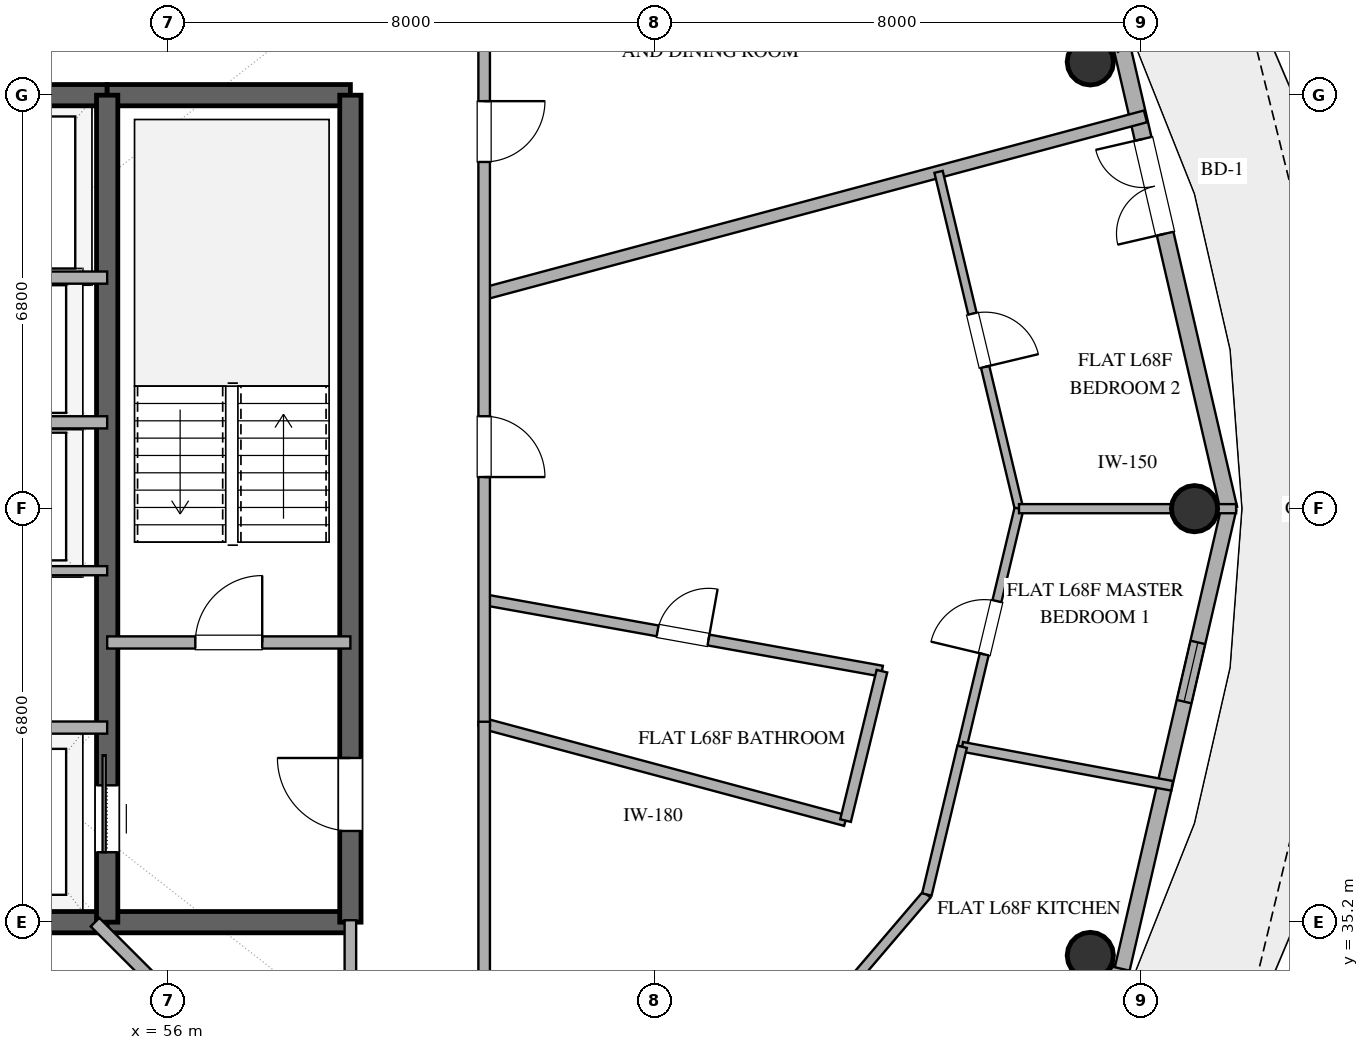
"""IFC4 building model, lengths in metres.
Left out: names, types, materials, properties, quantities, classifications, styles, units other than length and angle.
Written with IfcOpenShell. Run it as: python <this file> out.ifc"""

import sys

from ifc_helpers import new_model, si_unit, direction, frame, frame_2d, origin, origin_2d, place, context, subcontext, project, spatial, rectangle, hollow_circle, extrude, element, fill, save


model = new_model("IFC4")
c1 = context("Model", 3, precision=1e-05, world=origin(), true_north=direction((0.0, 1.0)))
c2 = subcontext(c1, "Body", "Model", "MODEL_VIEW")
j1 = project(units=[si_unit("LENGTHUNIT", "METRE"), si_unit("PLANEANGLEUNIT", "RADIAN")], contexts=[c1])
p1 = place(None, origin())
s1 = spatial("IfcSite", under=j1, at=p1, CompositionType="ELEMENT")
p2 = place(p1, origin())
s2 = spatial("IfcBuilding", under=s1, at=p2, CompositionType="ELEMENT")
p3 = place(p2, frame((0.0, 0.0, 265.8)))
s3 = spatial("IfcBuildingStorey", under=s2, at=p3, CompositionType="ELEMENT", Elevation=265.8)
p4 = place(p3, frame((41.0, 35.2, 0.0), z_axis=(0.0, 0.0, 1.0), x_axis=(1.0, 0.0, 0.0)))
e1 = element("IfcWall", 1, at=p4, inside=s3, PredefinedType="SHEAR", context=c2, shape_type="SweptSolid", body=[
    extrude(rectangle(XDim=14.0, YDim=0.35, at=frame_2d((7.0, 0.0))), origin(), (0.0, 0.0, 1.0), 3.37),
])
p5 = place(p4, frame((6.1, 0.0, 0.0)))
e2 = element("IfcOpeningElement", 2, at=p5, cuts=e1, PredefinedType="OPENING", context=c2, shape_type="SweptSolid", body=[
    extrude(rectangle(XDim=1.8, YDim=2.25, at=frame_2d((0.9, 1.125))), frame((0.0, 0.185, 0.0), z_axis=(0.0, -1.0, 0.0), x_axis=(1.0, 0.0, 0.0)), (0.0, 0.0, 1.0), 0.37),
])
p6 = place(p3, frame((55.0, 35.2, 0.0), z_axis=(0.0, 0.0, 1.0), x_axis=(1.0, 0.0, 0.0)))
e3 = element("IfcWall", 3, at=p6, inside=s3, PredefinedType="SHEAR", context=c2, shape_type="SweptSolid", body=[
    extrude(rectangle(XDim=4.0, YDim=0.35, at=frame_2d((2.0, 0.0))), origin(), (0.0, 0.0, 1.0), 3.37),
])
p7 = place(p3, frame((41.0, 48.8, 0.0), z_axis=(0.0, 0.0, 1.0), x_axis=(1.0, 0.0, 0.0)))
e4 = element("IfcWall", 4, at=p7, inside=s3, PredefinedType="SHEAR", context=c2, shape_type="SweptSolid", body=[
    extrude(rectangle(XDim=14.0, YDim=0.35, at=frame_2d((7.0, 0.0))), origin(), (0.0, 0.0, 1.0), 3.37),
])
p8 = place(p7, frame((6.1, 0.0, 0.0)))
e5 = element("IfcOpeningElement", 5, at=p8, cuts=e4, PredefinedType="OPENING", context=c2, shape_type="SweptSolid", body=[
    extrude(rectangle(XDim=1.8, YDim=2.25, at=frame_2d((0.9, 1.125))), frame((0.0, 0.185, 0.0), z_axis=(0.0, -1.0, 0.0), x_axis=(1.0, 0.0, 0.0)), (0.0, 0.0, 1.0), 0.37),
])
p9 = place(p3, frame((55.0, 48.8, 0.0), z_axis=(0.0, 0.0, 1.0), x_axis=(1.0, 0.0, 0.0)))
e6 = element("IfcWall", 6, at=p9, inside=s3, PredefinedType="SHEAR", context=c2, shape_type="SweptSolid", body=[
    extrude(rectangle(XDim=4.0, YDim=0.35, at=frame_2d((2.0, 0.0))), origin(), (0.0, 0.0, 1.0), 3.37),
])
p10 = place(p3, frame((59.0, 35.2, 0.0), z_axis=(0.0, 0.0, 1.0), x_axis=(0.0, 1.0, 0.0)))
e7 = element("IfcWall", 7, at=p10, inside=s3, PredefinedType="SHEAR", context=c2, shape_type="SweptSolid", body=[
    extrude(rectangle(XDim=13.6, YDim=0.35, at=frame_2d((6.8, 0.0))), origin(), (0.0, 0.0, 1.0), 3.37),
])
p11 = place(p10, frame((1.5, 0.0, 0.0)))
e8 = element("IfcOpeningElement", 8, at=p11, cuts=e7, PredefinedType="OPENING", context=c2, shape_type="SweptSolid", body=[
    extrude(rectangle(XDim=1.2, YDim=2.15, at=frame_2d((0.6, 1.075))), frame((0.0, 0.185, 0.0), z_axis=(0.0, -1.0, 0.0), x_axis=(1.0, 0.0, 0.0)), (0.0, 0.0, 1.0), 0.37),
])
p12 = place(p3, frame((55.0, 35.2, 0.0), z_axis=(0.0, 0.0, 1.0), x_axis=(0.0, 1.0, 0.0)))
e9 = element("IfcWall", 9, at=p12, inside=s3, PredefinedType="SHEAR", context=c2, shape_type="SweptSolid", body=[
    extrude(rectangle(XDim=13.6, YDim=0.35, at=frame_2d((6.8, 0.0))), origin(), (0.0, 0.0, 1.0), 3.37),
])
p13 = place(p12, frame((1.15, 0.0, 0.0)))
e10 = element("IfcOpeningElement", 10, at=p13, cuts=e9, PredefinedType="OPENING", context=c2, shape_type="SweptSolid", body=[
    extrude(rectangle(XDim=1.1, YDim=2.2, at=frame_2d((0.55, 1.1))), frame((0.0, 0.185, 0.0), z_axis=(0.0, -1.0, 0.0), x_axis=(1.0, 0.0, 0.0)), (0.0, 0.0, 1.0), 0.37),
])
for number, where, z_axis, x_axis in (
    (11, (72.883, 42.0, 0.0), (0.0, 0.0, 1.0), (1.0, 0.0, 0.0)),
    (12, (71.169, 49.347, 0.0), (0.0, 0.0, 1.0), (1.0, 0.0, 0.0)),
    (13, (71.169, 34.653, 0.0), (0.0, 0.0, 1.0), (1.0, 0.0, 0.0)),
):
    element("IfcColumn", number, at=place(p3, frame(where, z_axis=z_axis, x_axis=x_axis)), inside=s3, PredefinedType="COLUMN", context=c2, shape_type="SweptSolid", body=[
        extrude(hollow_circle(Radius=0.381, WallThickness=0.025, at=origin_2d()), origin(), (0.0, 0.0, 1.0), 3.37),
    ])
p14 = place(p3, frame((73.447, 42.0, 0.0), z_axis=(0.0, 0.0, 1.0), x_axis=(-0.225635078214, 0.974211892495, 0.0)))
e14 = element("IfcWall", 14, at=p14, inside=s3, PredefinedType="SOLIDWALL", context=c2, shape_type="SweptSolid", body=[
    extrude(rectangle(XDim=7.77, YDim=0.28, at=frame_2d((3.885, 0.0))), origin(), (0.0, 0.0, 1.0), 3.37),
])
p15 = place(p14, frame((4.642, 0.0, 0.0)))
e15 = element("IfcOpeningElement", 15, at=p15, cuts=e14, PredefinedType="OPENING", context=c2, shape_type="SweptSolid", body=[
    extrude(rectangle(XDim=1.6, YDim=2.25, at=frame_2d((0.8, 1.125))), frame((0.0, 0.15, 0.0), z_axis=(0.0, -1.0, 0.0), x_axis=(1.0, 0.0, 0.0)), (0.0, 0.0, 1.0), 0.3),
])
p16 = place(p3, frame((66.383, 28.013, 0.0), z_axis=(0.0, 0.0, 1.0), x_axis=(0.63761509934, 0.770355103243, 0.0)))
e16 = element("IfcWall", 16, at=p16, inside=s3, PredefinedType="SOLIDWALL", context=c2, shape_type="SweptSolid", body=[
    extrude(rectangle(XDim=8.33, YDim=0.28, at=frame_2d((4.165, 0.0))), origin(), (0.0, 0.0, 1.0), 3.37),
])
p17 = place(p16, frame((1.789, 0.0, 0.85)))
e17 = element("IfcOpeningElement", 17, at=p17, cuts=e16, PredefinedType="OPENING", context=c2, shape_type="SweptSolid", body=[
    extrude(rectangle(XDim=1.5, YDim=2.0, at=frame_2d((0.75, 1.0))), frame((0.0, 0.15, 0.0), z_axis=(0.0, -1.0, 0.0), x_axis=(1.0, 0.0, 0.0)), (0.0, 0.0, 1.0), 0.3),
])
p18 = place(p16, frame((3.621, 0.0, 0.85)))
e18 = element("IfcOpeningElement", 18, at=p18, cuts=e16, PredefinedType="OPENING", context=c2, shape_type="SweptSolid", body=[
    extrude(rectangle(XDim=1.5, YDim=2.0, at=frame_2d((0.75, 1.0))), frame((0.0, 0.15, 0.0), z_axis=(0.0, -1.0, 0.0), x_axis=(1.0, 0.0, 0.0)), (0.0, 0.0, 1.0), 0.3),
])
p19 = place(p3, frame((71.694, 34.43, 0.0), z_axis=(0.0, 0.0, 1.0), x_axis=(0.225635078214, 0.974211892495, 0.0)))
e19 = element("IfcWall", 19, at=p19, inside=s3, PredefinedType="SOLIDWALL", context=c2, shape_type="SweptSolid", body=[
    extrude(rectangle(XDim=7.77, YDim=0.25, at=frame_2d((3.885, 0.0))), origin(), (0.0, 0.0, 1.0), 3.37),
])
p20 = place(p19, frame((4.513, 0.0, 0.35)))
e20 = element("IfcOpeningElement", 20, at=p20, cuts=e19, PredefinedType="OPENING", context=c2, shape_type="SweptSolid", body=[
    extrude(rectangle(XDim=1.0, YDim=1.05, at=frame_2d((0.5, 0.525))), frame((0.0, 0.135, 0.0), z_axis=(0.0, -1.0, 0.0), x_axis=(1.0, 0.0, 0.0)), (0.0, 0.0, 1.0), 0.27),
])
p21 = place(p3, frame((55.0, 39.8, 0.0), z_axis=(0.0, 0.0, 1.0), x_axis=(1.0, 0.0, 0.0)))
e21 = element("IfcWall", 21, at=p21, inside=s3, PredefinedType="SOLIDWALL", context=c2, shape_type="SweptSolid", body=[
    extrude(rectangle(XDim=4.0, YDim=0.2, at=frame_2d((2.0, 0.0))), origin(), (0.0, 0.0, 1.0), 2.73),
])
p22 = place(p21, frame((1.45, 0.0, 0.0)))
e22 = element("IfcOpeningElement", 22, at=p22, cuts=e21, PredefinedType="OPENING", context=c2, shape_type="SweptSolid", body=[
    extrude(rectangle(XDim=1.1, YDim=2.15, at=frame_2d((0.55, 1.075))), frame((0.0, 0.11, 0.0), z_axis=(0.0, -1.0, 0.0), x_axis=(1.0, 0.0, 0.0)), (0.0, 0.0, 1.0), 0.22),
])
for number, where, z_axis, x_axis in (
    (23, (52.05, 38.4, 0.0), (0.0, 0.0, 1.0), (1.0, 0.0, 0.0)),
    (24, (52.05, 43.42, 0.0), (0.0, 0.0, 1.0), (1.0, 0.0, 0.0)),
    (25, (52.05, 45.8, 0.0), (0.0, 0.0, 1.0), (1.0, 0.0, 0.0)),
):
    element("IfcWall", number, at=place(p3, frame(where, z_axis=z_axis, x_axis=x_axis)), inside=s3, PredefinedType="SOLIDWALL", context=c2, shape_type="SweptSolid", body=[
        extrude(rectangle(XDim=2.95, YDim=0.2, at=frame_2d((1.475, 0.0))), origin(), (0.0, 0.0, 1.0), 2.73),
    ])
p23 = place(p3, frame((49.5, 40.98, 0.0), z_axis=(0.0, 0.0, 1.0), x_axis=(1.0, 0.0, 0.0)))
e26 = element("IfcWall", 26, at=p23, inside=s3, PredefinedType="PARTITIONING", context=c2, shape_type="SweptSolid", body=[
    extrude(rectangle(XDim=5.5, YDim=0.15, at=frame_2d((2.75, 0.0))), origin(), (0.0, 0.0, 1.0), 2.73),
])
p24 = place(p3, frame((63.561, 26.439, 0.0), z_axis=(0.0, 0.0, 1.0), x_axis=(-0.707106781187, 0.707106781187, 0.0)))
e27 = element("IfcWall", 27, at=p24, inside=s3, PredefinedType="PARTITIONING", context=c2, shape_type="SweptSolid", body=[
    extrude(rectangle(XDim=12.389, YDim=0.2, at=frame_2d((6.195, 0.0))), origin(), (0.0, 0.0, 1.0), 2.73),
])
p25 = place(p3, frame((51.322, 35.2, 0.0), z_axis=(0.0, 0.0, 1.0), x_axis=(0.343730484072, -0.939068343796, 0.0)))
e28 = element("IfcWall", 28, at=p25, inside=s3, PredefinedType="PLUMBINGWALL", context=c2, shape_type="SweptSolid", body=[
    extrude(rectangle(XDim=7.897, YDim=0.18, at=frame_2d((3.949, 0.0))), origin(), (0.0, 0.0, 1.0), 2.73),
])
p26 = place(p25, frame((3.524, 0.0, 0.0)))
e29 = element("IfcOpeningElement", 29, at=p26, cuts=e28, PredefinedType="OPENING", context=c2, shape_type="SweptSolid", body=[
    extrude(rectangle(XDim=0.85, YDim=2.1, at=frame_2d((0.425, 1.05))), frame((0.0, 0.1, 0.0), z_axis=(0.0, -1.0, 0.0), x_axis=(1.0, 0.0, 0.0)), (0.0, 0.0, 1.0), 0.2),
])
p27 = place(p3, frame((72.076, 48.451, 0.0), z_axis=(0.0, 0.0, 1.0), x_axis=(-0.965923661364, -0.258827124578, 0.0)))
e30 = element("IfcWall", 30, at=p27, inside=s3, PredefinedType="PARTITIONING", context=c2, shape_type="SweptSolid", body=[
    extrude(rectangle(XDim=11.26, YDim=0.2, at=frame_2d((5.63, 0.0))), origin(), (0.0, 0.0, 1.0), 2.73),
])
p28 = place(p3, frame((61.2, 40.503, 0.0), z_axis=(0.0, 0.0, 1.0), x_axis=(0.984255481107, -0.176751656034, 0.0)))
e31 = element("IfcWall", 31, at=p28, inside=s3, PredefinedType="PLUMBINGWALL", context=c2, shape_type="SweptSolid", body=[
    extrude(rectangle(XDim=6.647, YDim=0.18, at=frame_2d((3.323, 0.0))), origin(), (0.0, 0.0, 1.0), 2.73),
])
p29 = place(p28, frame((2.898, 0.0, 0.0)))
e32 = element("IfcOpeningElement", 32, at=p29, cuts=e31, PredefinedType="OPENING", context=c2, shape_type="SweptSolid", body=[
    extrude(rectangle(XDim=0.85, YDim=2.1, at=frame_2d((0.425, 1.05))), frame((0.0, 0.1, 0.0), z_axis=(0.0, -1.0, 0.0), x_axis=(1.0, 0.0, 0.0)), (0.0, 0.0, 1.0), 0.2),
])
p30 = place(p3, frame((67.144, 36.871, 0.0), z_axis=(0.0, 0.0, 1.0), x_axis=(-0.965930696626, 0.258800868073, 0.0)))
e33 = element("IfcWall", 33, at=p30, inside=s3, PredefinedType="PLUMBINGWALL", context=c2, shape_type="SweptSolid", body=[
    extrude(rectangle(XDim=6.154, YDim=0.18, at=frame_2d((3.077, 0.0))), origin(), (0.0, 0.0, 1.0), 2.73),
])
p31 = place(p3, frame((68.673, 47.539, 0.0), z_axis=(0.0, 0.0, 1.0), x_axis=(0.232304342064, -0.972643147644, 0.0)))
e34 = element("IfcWall", 34, at=p31, inside=s3, PredefinedType="PARTITIONING", context=c2, shape_type="SweptSolid", body=[
    extrude(rectangle(XDim=5.695, YDim=0.14, at=frame_2d((2.848, 0.0))), origin(), (0.0, 0.0, 1.0), 2.73),
])
p32 = place(p31, frame((2.398, 0.0, 0.0)))
e35 = element("IfcOpeningElement", 35, at=p32, cuts=e34, PredefinedType="OPENING", context=c2, shape_type="SweptSolid", body=[
    extrude(rectangle(XDim=0.9, YDim=2.1, at=frame_2d((0.45, 1.05))), frame((0.0, 0.08, 0.0), z_axis=(0.0, -1.0, 0.0), x_axis=(1.0, 0.0, 0.0)), (0.0, 0.0, 1.0), 0.16),
])
p33 = place(p3, frame((61.2, 50.9, 0.0), z_axis=(0.0, 0.0, 1.0), x_axis=(0.0, -1.0, 0.0)))
e36 = element("IfcWall", 36, at=p33, inside=s3, PredefinedType="PARTITIONING", context=c2, shape_type="SweptSolid", body=[
    extrude(rectangle(XDim=12.47, YDim=0.19, at=frame_2d((6.235, 0.0))), origin(), (0.0, 0.0, 1.0), 2.73),
])
p34 = place(p33, frame((2.198, 0.0, 0.0)))
e37 = element("IfcOpeningElement", 37, at=p34, cuts=e36, PredefinedType="OPENING", context=c2, shape_type="SweptSolid", body=[
    extrude(rectangle(XDim=1.0, YDim=2.2, at=frame_2d((0.5, 1.1))), frame((0.0, 0.105, 0.0), z_axis=(0.0, -1.0, 0.0), x_axis=(1.0, 0.0, 0.0)), (0.0, 0.0, 1.0), 0.21),
])
p35 = place(p33, frame((7.38, 0.0, 0.0)))
e38 = element("IfcOpeningElement", 38, at=p35, cuts=e36, PredefinedType="OPENING", context=c2, shape_type="SweptSolid", body=[
    extrude(rectangle(XDim=1.0, YDim=2.2, at=frame_2d((0.5, 1.1))), frame((0.0, 0.105, 0.0), z_axis=(0.0, -1.0, 0.0), x_axis=(1.0, 0.0, 0.0)), (0.0, 0.0, 1.0), 0.21),
])
p36 = place(p3, frame((61.2, 38.496, 0.0), z_axis=(0.0, 0.0, 1.0), x_axis=(0.0, -1.0, 0.0)))
e39 = element("IfcWall", 39, at=p36, inside=s3, PredefinedType="PARTITIONING", context=c2, shape_type="SweptSolid", body=[
    extrude(rectangle(XDim=4.496, YDim=0.19, at=frame_2d((2.248, 0.0))), origin(), (0.0, 0.0, 1.0), 2.73),
])
p37 = place(p3, frame((69.061, 38.084, 0.0), z_axis=(0.0, 0.0, 1.0), x_axis=(0.232333768072, 0.972636119118, 0.0)))
e40 = element("IfcWall", 40, at=p37, inside=s3, PredefinedType="PARTITIONING", context=c2, shape_type="SweptSolid", body=[
    extrude(rectangle(XDim=4.026, YDim=0.15, at=frame_2d((2.013, 0.0))), origin(), (0.0, 0.0, 1.0), 2.73),
])
p38 = place(p37, frame((1.563, 0.0, 0.0)))
e41 = element("IfcOpeningElement", 41, at=p38, cuts=e40, PredefinedType="OPENING", context=c2, shape_type="SweptSolid", body=[
    extrude(rectangle(XDim=0.9, YDim=2.1, at=frame_2d((0.45, 1.05))), frame((0.0, 0.085, 0.0), z_axis=(0.0, -1.0, 0.0), x_axis=(1.0, 0.0, 0.0)), (0.0, 0.0, 1.0), 0.17),
])
p39 = place(p3, frame((69.996, 42.0, 0.0), z_axis=(0.0, 0.0, 1.0), x_axis=(1.0, 0.0, 0.0)))
e42 = element("IfcWall", 42, at=p39, inside=s3, PredefinedType="PARTITIONING", context=c2, shape_type="SweptSolid", body=[
    extrude(rectangle(XDim=3.571, YDim=0.15, at=frame_2d((1.785, 0.0))), origin(), (0.0, 0.0, 1.0), 2.73),
])
p40 = place(p3, frame((72.514, 37.442, 0.0), z_axis=(0.0, 0.0, 1.0), x_axis=(-0.983150389917, 0.182798552526, 0.0)))
e43 = element("IfcWall", 43, at=p40, inside=s3, PredefinedType="PLUMBINGWALL", context=c2, shape_type="SweptSolid", body=[
    extrude(rectangle(XDim=3.512, YDim=0.16, at=frame_2d((1.756, 0.0))), origin(), (0.0, 0.0, 1.0), 2.73),
])
p41 = place(p3, frame((67.742, 39.328, 0.0), z_axis=(0.0, 0.0, 1.0), x_axis=(-0.236511691524, -0.971628642935, 0.0)))
e44 = element("IfcWall", 44, at=p41, inside=s3, PredefinedType="PLUMBINGWALL", context=c2, shape_type="SweptSolid", body=[
    extrude(rectangle(XDim=2.529, YDim=0.18, at=frame_2d((1.265, 0.0))), origin(), (0.0, 0.0, 1.0), 2.73),
])
p42 = place(p3, frame((66.858, 33.754, 0.0), z_axis=(0.0, 0.0, 1.0), x_axis=(0.649277541607, 0.760551559044, 0.0)))
e45 = element("IfcWall", 45, at=p42, inside=s3, PredefinedType="PLUMBINGWALL", context=c2, shape_type="SweptSolid", body=[
    extrude(rectangle(XDim=2.499, YDim=0.16, at=frame_2d((1.25, 0.0))), origin(), (0.0, 0.0, 1.0), 2.73),
])
p43 = place(p3, frame((68.481, 35.655, 0.0), z_axis=(0.0, 0.0, 1.0), x_axis=(0.232241557879, 0.972658140764, 0.0)))
e46 = element("IfcWall", 46, at=p43, inside=s3, PredefinedType="PLUMBINGWALL", context=c2, shape_type="SweptSolid", body=[
    extrude(rectangle(XDim=2.498, YDim=0.16, at=frame_2d((1.249, 0.0))), origin(), (0.0, 0.0, 1.0), 2.73),
])
p44 = place(p3, frame((59.0, 34.0, 0.0), z_axis=(0.0, 0.0, 1.0), x_axis=(0.0, 1.0, 0.0)))
e47 = element("IfcWall", 47, at=p44, inside=s3, PredefinedType="PARTITIONING", context=c2, shape_type="SweptSolid", body=[
    extrude(rectangle(XDim=1.232, YDim=0.19, at=frame_2d((0.616, 0.0))), origin(), (0.0, 0.0, 1.0), 2.73),
])
p45 = place(p15, origin())
e48 = element("IfcDoor", 48, at=p45, inside=s3, OperationType="DOUBLE_DOOR_SINGLE_SWING", PredefinedType="DOOR", context=c2, shape_type="SweptSolid", body=[
    extrude(rectangle(XDim=1.6, YDim=2.25, at=frame_2d((0.8, 1.125))), frame((0.0, 0.025, 0.0), z_axis=(0.0, -1.0, 0.0), x_axis=(1.0, 0.0, 0.0)), (0.0, 0.0, 1.0), 0.05),
])
fill(e15, e48)
p46 = place(p20, origin())
e49 = element("IfcWindow", 49, at=p46, inside=s3, PartitioningType="SINGLE_PANEL", PredefinedType="WINDOW", context=c2, shape_type="SweptSolid", body=[
    extrude(rectangle(XDim=1.0, YDim=1.05, at=frame_2d((0.5, 0.525))), frame((0.0, 0.03, 0.0), z_axis=(0.0, -1.0, 0.0), x_axis=(1.0, 0.0, 0.0)), (0.0, 0.0, 1.0), 0.06),
])
fill(e20, e49)
p47 = place(p13, origin())
e50 = element("IfcDoor", 50, at=p47, inside=s3, OperationType="SLIDING_TO_RIGHT", PredefinedType="DOOR", context=c2, shape_type="SweptSolid", body=[
    extrude(rectangle(XDim=1.1, YDim=2.2, at=frame_2d((0.55, 1.1))), frame((0.0, 0.025, 0.0), z_axis=(0.0, -1.0, 0.0), x_axis=(1.0, 0.0, 0.0)), (0.0, 0.0, 1.0), 0.05),
])
fill(e10, e50)
p48 = place(p11, origin())
e51 = element("IfcDoor", 51, at=p48, inside=s3, OperationType="SINGLE_SWING_RIGHT", PredefinedType="DOOR", context=c2, shape_type="SweptSolid", body=[
    extrude(rectangle(XDim=1.2, YDim=2.15, at=frame_2d((0.6, 1.075))), frame((0.0, 0.025, 0.0), z_axis=(0.0, -1.0, 0.0), x_axis=(1.0, 0.0, 0.0)), (0.0, 0.0, 1.0), 0.05),
])
fill(e8, e51)
p49 = place(p22, origin())
e52 = element("IfcDoor", 52, at=p49, inside=s3, OperationType="SINGLE_SWING_RIGHT", PredefinedType="DOOR", context=c2, shape_type="SweptSolid", body=[
    extrude(rectangle(XDim=1.1, YDim=2.15, at=frame_2d((0.55, 1.075))), frame((0.0, 0.025, 0.0), z_axis=(0.0, -1.0, 0.0), x_axis=(1.0, 0.0, 0.0)), (0.0, 0.0, 1.0), 0.05),
])
fill(e22, e52)
p50 = place(p29, origin())
e53 = element("IfcDoor", 53, at=p50, inside=s3, OperationType="SINGLE_SWING_RIGHT", PredefinedType="DOOR", context=c2, shape_type="SweptSolid", body=[
    extrude(rectangle(XDim=0.85, YDim=2.1, at=frame_2d((0.425, 1.05))), frame((0.0, 0.025, 0.0), z_axis=(0.0, -1.0, 0.0), x_axis=(1.0, 0.0, 0.0)), (0.0, 0.0, 1.0), 0.05),
])
fill(e32, e53)
p51 = place(p32, origin())
e54 = element("IfcDoor", 54, at=p51, inside=s3, OperationType="SINGLE_SWING_RIGHT", PredefinedType="DOOR", context=c2, shape_type="SweptSolid", body=[
    extrude(rectangle(XDim=0.9, YDim=2.1, at=frame_2d((0.45, 1.05))), frame((0.0, 0.025, 0.0), z_axis=(0.0, -1.0, 0.0), x_axis=(1.0, 0.0, 0.0)), (0.0, 0.0, 1.0), 0.05),
])
fill(e35, e54)
p52 = place(p34, origin())
e55 = element("IfcDoor", 55, at=p52, inside=s3, OperationType="SINGLE_SWING_LEFT", PredefinedType="DOOR", context=c2, shape_type="SweptSolid", body=[
    extrude(rectangle(XDim=1.0, YDim=2.2, at=frame_2d((0.5, 1.1))), frame((0.0, 0.025, 0.0), z_axis=(0.0, -1.0, 0.0), x_axis=(1.0, 0.0, 0.0)), (0.0, 0.0, 1.0), 0.05),
])
fill(e37, e55)
p53 = place(p35, origin())
e56 = element("IfcDoor", 56, at=p53, inside=s3, OperationType="SINGLE_SWING_RIGHT", PredefinedType="DOOR", context=c2, shape_type="SweptSolid", body=[
    extrude(rectangle(XDim=1.0, YDim=2.2, at=frame_2d((0.5, 1.1))), frame((0.0, 0.025, 0.0), z_axis=(0.0, -1.0, 0.0), x_axis=(1.0, 0.0, 0.0)), (0.0, 0.0, 1.0), 0.05),
])
fill(e38, e56)
p54 = place(p38, origin())
e57 = element("IfcDoor", 57, at=p54, inside=s3, OperationType="SINGLE_SWING_LEFT", PredefinedType="DOOR", context=c2, shape_type="SweptSolid", body=[
    extrude(rectangle(XDim=0.9, YDim=2.1, at=frame_2d((0.45, 1.05))), frame((0.0, 0.025, 0.0), z_axis=(0.0, -1.0, 0.0), x_axis=(1.0, 0.0, 0.0)), (0.0, 0.0, 1.0), 0.05),
])
fill(e41, e57)
save(model, sys.argv[1])
